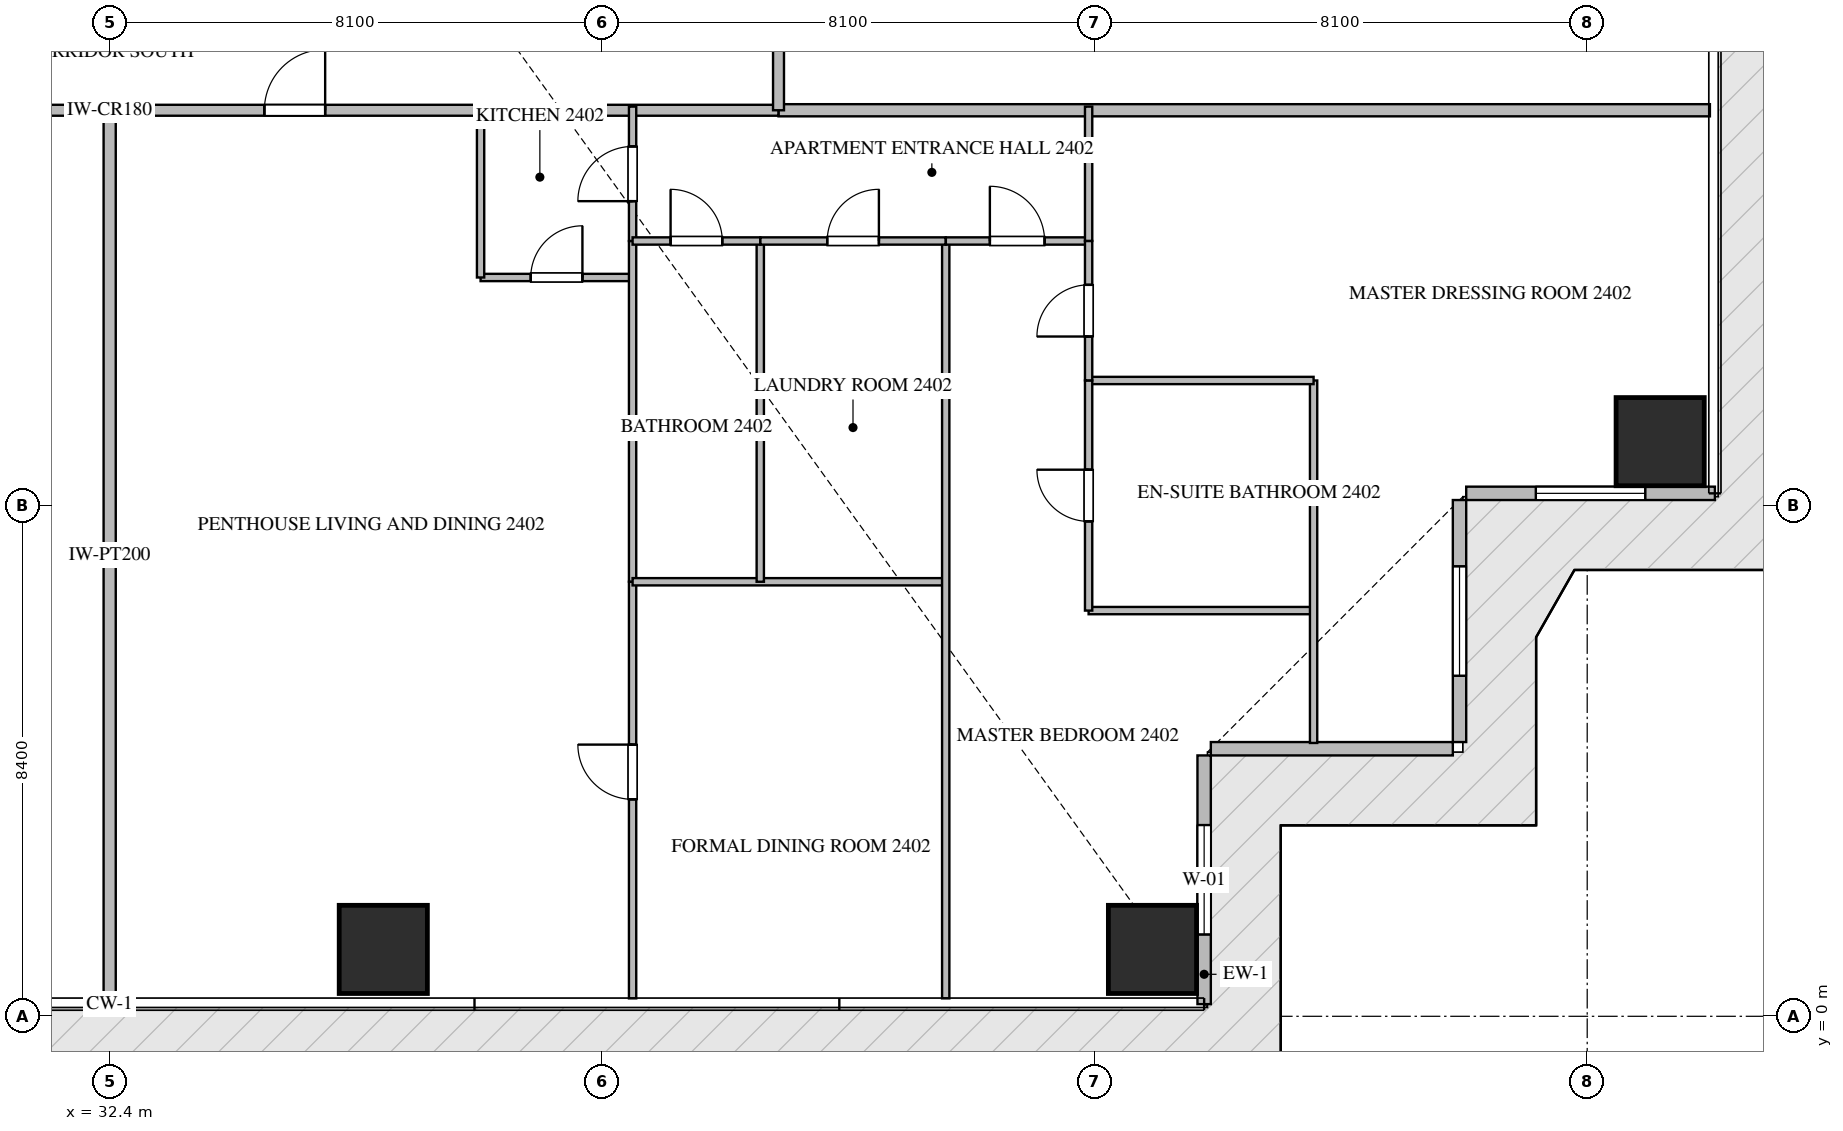
"""IFC4 building model, lengths in metres.
Left out: names, types, materials, properties, quantities, classifications, styles, units other than length and angle.
Written with IfcOpenShell. Run it as: python <this file> out.ifc"""

import sys

from ifc_helpers import new_model, si_unit, direction, frame, frame_2d, origin, origin_2d, place, context, subcontext, project, spatial, rectangle, extrude, source, transform, mapped, element, fill, save


model = new_model("IFC4")
c1 = context("Model", 3, precision=1e-05, world=origin(), true_north=direction((0.0, 1.0)))
c2 = subcontext(c1, "Body", "Model", "MODEL_VIEW")
j1 = project(units=[si_unit("LENGTHUNIT", "METRE"), si_unit("PLANEANGLEUNIT", "RADIAN")], contexts=[c1])
p1 = place(None, origin())
s1 = spatial("IfcSite", under=j1, at=p1, CompositionType="ELEMENT")
p2 = place(p1, origin())
s2 = spatial("IfcBuilding", under=s1, at=p2, CompositionType="ELEMENT")
p3 = place(p2, frame((0.0, 0.0, 97.95)))
s3 = spatial("IfcBuildingStorey", under=s2, at=p3, CompositionType="ELEMENT", Elevation=97.95)
m1 = source(origin(), c2, "Body", "SweptSolid", [
    extrude(rectangle(XDim=1.45, YDim=1.45, at=origin_2d()), origin(), (0.0, 0.0, 1.0), 3.75),
])
for number, where, z_axis, x_axis in (
    (1, (36.9, 1.1, -0.26), (0.0, 0.0, 1.0), (1.0, 0.0, 0.0)),
    (2, (49.55, 1.1, -0.26), (0.0, 0.0, 1.0), (1.0, 0.0, 0.0)),
    (3, (57.9, 9.45, -0.26), (0.0, 0.0, 1.0), (1.0, 0.0, 0.0)),
):
    element("IfcColumn", number, at=place(p3, frame(where, z_axis=z_axis, x_axis=x_axis)), inside=s3, PredefinedType="COLUMN", context=c2, shape_type="MappedRepresentation", body=[
        mapped(m1, transform((0.0, 0.0, 0.0), scale=1.0)),
    ])
p4 = place(p3, frame((50.4, 0.2, 0.0), z_axis=(0.0, 0.0, 1.0), x_axis=(0.0, 1.0, 0.0)))
e4 = element("IfcWall", 4, at=p4, inside=s3, PredefinedType="ELEMENTEDWALL", context=c2, shape_type="SweptSolid", body=[
    extrude(rectangle(XDim=4.09, YDim=0.22, at=frame_2d((2.045, 0.0))), origin(), (0.0, 0.0, 1.0), 3.475),
])
p5 = place(p4, frame((1.145, 0.0, 0.65)))
e5 = element("IfcOpeningElement", 5, at=p5, cuts=e4, PredefinedType="OPENING", context=c2, shape_type="SweptSolid", body=[
    extrude(rectangle(XDim=1.8, YDim=2.1, at=frame_2d((0.9, 1.05))), frame((0.0, 0.12, 0.0), z_axis=(0.0, -1.0, 0.0), x_axis=(1.0, 0.0, 0.0)), (0.0, 0.0, 1.0), 0.24),
])
p6 = place(p3, frame((50.51, 4.4, 0.0), z_axis=(0.0, 0.0, 1.0), x_axis=(1.0, 0.0, 0.0)))
e6 = element("IfcWall", 6, at=p6, inside=s3, PredefinedType="ELEMENTEDWALL", context=c2, shape_type="SweptSolid", body=[
    extrude(rectangle(XDim=3.98, YDim=0.22, at=frame_2d((1.99, 0.0))), origin(), (0.0, 0.0, 1.0), 3.475),
])
p7 = place(p3, frame((54.6, 4.51, 0.0), z_axis=(0.0, 0.0, 1.0), x_axis=(0.0, 1.0, 0.0)))
e7 = element("IfcWall", 7, at=p7, inside=s3, PredefinedType="ELEMENTEDWALL", context=c2, shape_type="SweptSolid", body=[
    extrude(rectangle(XDim=3.98, YDim=0.22, at=frame_2d((1.99, 0.0))), origin(), (0.0, 0.0, 1.0), 3.475),
])
p8 = place(p7, frame((1.09, 0.0, 0.65)))
e8 = element("IfcOpeningElement", 8, at=p8, cuts=e7, PredefinedType="OPENING", context=c2, shape_type="SweptSolid", body=[
    extrude(rectangle(XDim=1.8, YDim=2.1, at=frame_2d((0.9, 1.05))), frame((0.0, 0.12, 0.0), z_axis=(0.0, -1.0, 0.0), x_axis=(1.0, 0.0, 0.0)), (0.0, 0.0, 1.0), 0.24),
])
p9 = place(p3, frame((54.71, 8.6, 0.0), z_axis=(0.0, 0.0, 1.0), x_axis=(1.0, 0.0, 0.0)))
e9 = element("IfcWall", 9, at=p9, inside=s3, PredefinedType="ELEMENTEDWALL", context=c2, shape_type="SweptSolid", body=[
    extrude(rectangle(XDim=4.09, YDim=0.22, at=frame_2d((2.045, 0.0))), origin(), (0.0, 0.0, 1.0), 3.475),
])
p10 = place(p9, frame((1.145, 0.0, 0.65)))
e10 = element("IfcOpeningElement", 10, at=p10, cuts=e9, PredefinedType="OPENING", context=c2, shape_type="SweptSolid", body=[
    extrude(rectangle(XDim=1.8, YDim=2.1, at=frame_2d((0.9, 1.05))), frame((0.0, 0.12, 0.0), z_axis=(0.0, -1.0, 0.0), x_axis=(1.0, 0.0, 0.0)), (0.0, 0.0, 1.0), 0.24),
])
p11 = place(p3, frame((32.4, 0.282, 0.0), z_axis=(0.0, 0.0, 1.0), x_axis=(0.0, 1.0, 0.0)))
e11 = element("IfcWall", 11, at=p11, inside=s3, PredefinedType="PARTITIONING", context=c2, shape_type="SweptSolid", body=[
    extrude(rectangle(XDim=14.618, YDim=0.2, at=frame_2d((7.309, 0.0))), origin(), (0.0, 0.0, 1.0), 3.49),
])
p12 = place(p3, frame((43.4, 14.9, 0.0), z_axis=(0.0, 0.0, 1.0), x_axis=(1.0, 0.0, 0.0)))
e12 = element("IfcWall", 12, at=p12, inside=s3, PredefinedType="PARTITIONING", context=c2, shape_type="SweptSolid", body=[
    extrude(rectangle(XDim=15.318, YDim=0.2, at=frame_2d((7.659, 0.0))), origin(), (0.0, 0.0, 1.0), 3.49),
])
p13 = place(p3, frame((21.402, 14.9, 0.0), z_axis=(0.0, 0.0, 1.0), x_axis=(1.0, 0.0, 0.0)))
e13 = element("IfcWall", 13, at=p13, inside=s3, PredefinedType="PARTITIONING", context=c2, shape_type="SweptSolid", body=[
    extrude(rectangle(XDim=21.996, YDim=0.18, at=frame_2d((10.998, 0.0))), origin(), (0.0, 0.0, 1.0), 3.49),
])
p14 = place(p13, frame((7.454, 0.0, 0.0)))
e14 = element("IfcOpeningElement", 14, at=p14, cuts=e13, PredefinedType="OPENING", context=c2, shape_type="SweptSolid", body=[
    extrude(rectangle(XDim=1.0, YDim=2.15, at=frame_2d((0.5, 1.075))), frame((0.0, 0.1, 0.0), z_axis=(0.0, -1.0, 0.0), x_axis=(1.0, 0.0, 0.0)), (0.0, 0.0, 1.0), 0.2),
])
p15 = place(p13, frame((13.542, 0.0, 0.0)))
e15 = element("IfcOpeningElement", 15, at=p15, cuts=e13, PredefinedType="OPENING", context=c2, shape_type="SweptSolid", body=[
    extrude(rectangle(XDim=1.0, YDim=2.15, at=frame_2d((0.5, 1.075))), frame((0.0, 0.1, 0.0), z_axis=(0.0, -1.0, 0.0), x_axis=(1.0, 0.0, 0.0)), (0.0, 0.0, 1.0), 0.2),
])
p16 = place(p3, frame((43.4, 14.9, 0.0), z_axis=(0.0, 0.0, 1.0), x_axis=(0.0, 1.0, 0.0)))
e16 = element("IfcWall", 16, at=p16, inside=s3, PredefinedType="PARTITIONING", context=c2, shape_type="SweptSolid", body=[
    extrude(rectangle(XDim=20.6, YDim=0.18, at=frame_2d((10.3, 0.0))), origin(), (0.0, 0.0, 1.0), 3.49),
])
p17 = place(p16, frame((1.96, 0.0, 0.0)))
e17 = element("IfcOpeningElement", 17, at=p17, cuts=e16, PredefinedType="OPENING", context=c2, shape_type="SweptSolid", body=[
    extrude(rectangle(XDim=1.0, YDim=2.15, at=frame_2d((0.5, 1.075))), frame((0.0, 0.1, 0.0), z_axis=(0.0, -1.0, 0.0), x_axis=(1.0, 0.0, 0.0)), (0.0, 0.0, 1.0), 0.2),
])
p18 = place(p3, frame((38.5, 12.15, 0.0), z_axis=(0.0, 0.0, 1.0), x_axis=(1.0, 0.0, 0.0)))
e18 = element("IfcWall", 18, at=p18, inside=s3, PredefinedType="PARTITIONING", context=c2, shape_type="SweptSolid", body=[
    extrude(rectangle(XDim=2.5, YDim=0.12, at=frame_2d((1.25, 0.0))), origin(), (0.0, 0.0, 1.0), 3.49),
])
p19 = place(p18, frame((0.825, 0.0, 0.0)))
e19 = element("IfcOpeningElement", 19, at=p19, cuts=e18, PredefinedType="OPENING", context=c2, shape_type="SweptSolid", body=[
    extrude(rectangle(XDim=0.85, YDim=2.1, at=frame_2d((0.425, 1.05))), frame((0.0, 0.07, 0.0), z_axis=(0.0, -1.0, 0.0), x_axis=(1.0, 0.0, 0.0)), (0.0, 0.0, 1.0), 0.14),
])
p20 = place(p3, frame((38.5, 12.15, 0.0), z_axis=(0.0, 0.0, 1.0), x_axis=(0.0, 1.0, 0.0)))
e20 = element("IfcWall", 20, at=p20, inside=s3, PredefinedType="PARTITIONING", context=c2, shape_type="SweptSolid", body=[
    extrude(rectangle(XDim=2.81, YDim=0.12, at=frame_2d((1.405, 0.0))), origin(), (0.0, 0.0, 1.0), 3.49),
])
p21 = place(p3, frame((41.0, 12.75, 0.0), z_axis=(0.0, 0.0, 1.0), x_axis=(0.0, 1.0, 0.0)))
e21 = element("IfcWall", 21, at=p21, inside=s3, PredefinedType="PARTITIONING", context=c2, shape_type="SweptSolid", body=[
    extrude(rectangle(XDim=2.21, YDim=0.12, at=frame_2d((1.105, 0.0))), origin(), (0.0, 0.0, 1.0), 3.49),
])
p22 = place(p21, frame((0.655, 0.0, 0.0)))
e22 = element("IfcOpeningElement", 22, at=p22, cuts=e21, PredefinedType="OPENING", context=c2, shape_type="SweptSolid", body=[
    extrude(rectangle(XDim=0.9, YDim=2.1, at=frame_2d((0.45, 1.05))), frame((0.0, 0.07, 0.0), z_axis=(0.0, -1.0, 0.0), x_axis=(1.0, 0.0, 0.0)), (0.0, 0.0, 1.0), 0.14),
])
p23 = place(p3, frame((41.0, 0.295, 0.0), z_axis=(0.0, 0.0, 1.0), x_axis=(0.0, 1.0, 0.0)))
e23 = element("IfcWall", 23, at=p23, inside=s3, PredefinedType="PARTITIONING", context=c2, shape_type="SweptSolid", body=[
    extrude(rectangle(XDim=6.851, YDim=0.12, at=frame_2d((3.426, 0.0))), origin(), (0.0, 0.0, 1.0), 3.49),
])
p24 = place(p23, frame((3.273, 0.0, 0.0)))
e24 = element("IfcOpeningElement", 24, at=p24, cuts=e23, PredefinedType="OPENING", context=c2, shape_type="SweptSolid", body=[
    extrude(rectangle(XDim=0.9, YDim=2.1, at=frame_2d((0.45, 1.05))), frame((0.0, 0.07, 0.0), z_axis=(0.0, -1.0, 0.0), x_axis=(1.0, 0.0, 0.0)), (0.0, 0.0, 1.0), 0.14),
])
p25 = place(p3, frame((41.0, 7.148, 0.0), z_axis=(0.0, 0.0, 1.0), x_axis=(0.0, 1.0, 0.0)))
e25 = element("IfcWall", 25, at=p25, inside=s3, PredefinedType="PARTITIONING", context=c2, shape_type="SweptSolid", body=[
    extrude(rectangle(XDim=5.6, YDim=0.12, at=frame_2d((2.8, 0.0))), origin(), (0.0, 0.0, 1.0), 3.49),
])
p26 = place(p3, frame((41.0, 7.146, 0.0), z_axis=(0.0, 0.0, 1.0), x_axis=(1.0, 0.0, 0.0)))
e26 = element("IfcWall", 26, at=p26, inside=s3, PredefinedType="PARTITIONING", context=c2, shape_type="SweptSolid", body=[
    extrude(rectangle(XDim=5.15, YDim=0.12, at=frame_2d((2.575, 0.0))), origin(), (0.0, 0.0, 1.0), 3.49),
])
p27 = place(p3, frame((46.15, 0.295, 0.0), z_axis=(0.0, 0.0, 1.0), x_axis=(0.0, 1.0, 0.0)))
e27 = element("IfcWall", 27, at=p27, inside=s3, PredefinedType="PARTITIONING", context=c2, shape_type="SweptSolid", body=[
    extrude(rectangle(XDim=12.455, YDim=0.12, at=frame_2d((6.228, 0.0))), origin(), (0.0, 0.0, 1.0), 3.49),
])
p28 = place(p3, frame((43.1, 7.146, 0.0), z_axis=(0.0, 0.0, 1.0), x_axis=(0.0, 1.0, 0.0)))
e28 = element("IfcWall", 28, at=p28, inside=s3, PredefinedType="PARTITIONING", context=c2, shape_type="SweptSolid", body=[
    extrude(rectangle(XDim=5.604, YDim=0.12, at=frame_2d((2.802, 0.0))), origin(), (0.0, 0.0, 1.0), 3.49),
])
p29 = place(p3, frame((41.0, 12.75, 0.0), z_axis=(0.0, 0.0, 1.0), x_axis=(1.0, 0.0, 0.0)))
e29 = element("IfcWall", 29, at=p29, inside=s3, PredefinedType="PARTITIONING", context=c2, shape_type="SweptSolid", body=[
    extrude(rectangle(XDim=2.1, YDim=0.12, at=frame_2d((1.05, 0.0))), origin(), (0.0, 0.0, 1.0), 3.49),
])
p30 = place(p29, frame((0.625, 0.0, 0.0)))
e30 = element("IfcOpeningElement", 30, at=p30, cuts=e29, PredefinedType="OPENING", context=c2, shape_type="SweptSolid", body=[
    extrude(rectangle(XDim=0.85, YDim=2.1, at=frame_2d((0.425, 1.05))), frame((0.0, 0.07, 0.0), z_axis=(0.0, -1.0, 0.0), x_axis=(1.0, 0.0, 0.0)), (0.0, 0.0, 1.0), 0.14),
])
p31 = place(p3, frame((43.102, 12.75, 0.0), z_axis=(0.0, 0.0, 1.0), x_axis=(1.0, 0.0, 0.0)))
e31 = element("IfcWall", 31, at=p31, inside=s3, PredefinedType="PARTITIONING", context=c2, shape_type="SweptSolid", body=[
    extrude(rectangle(XDim=3.048, YDim=0.12, at=frame_2d((1.524, 0.0))), origin(), (0.0, 0.0, 1.0), 3.49),
])
p32 = place(p31, frame((1.099, 0.0, 0.0)))
e32 = element("IfcOpeningElement", 32, at=p32, cuts=e31, PredefinedType="OPENING", context=c2, shape_type="SweptSolid", body=[
    extrude(rectangle(XDim=0.85, YDim=2.1, at=frame_2d((0.425, 1.05))), frame((0.0, 0.07, 0.0), z_axis=(0.0, -1.0, 0.0), x_axis=(1.0, 0.0, 0.0)), (0.0, 0.0, 1.0), 0.14),
])
p33 = place(p3, frame((46.152, 12.75, 0.0), z_axis=(0.0, 0.0, 1.0), x_axis=(1.0, 0.0, 0.0)))
e33 = element("IfcWall", 33, at=p33, inside=s3, PredefinedType="PARTITIONING", context=c2, shape_type="SweptSolid", body=[
    extrude(rectangle(XDim=2.348, YDim=0.12, at=frame_2d((1.174, 0.0))), origin(), (0.0, 0.0, 1.0), 3.49),
])
p34 = place(p33, frame((0.724, 0.0, 0.0)))
e34 = element("IfcOpeningElement", 34, at=p34, cuts=e33, PredefinedType="OPENING", context=c2, shape_type="SweptSolid", body=[
    extrude(rectangle(XDim=0.9, YDim=2.1, at=frame_2d((0.45, 1.05))), frame((0.0, 0.07, 0.0), z_axis=(0.0, -1.0, 0.0), x_axis=(1.0, 0.0, 0.0)), (0.0, 0.0, 1.0), 0.14),
])
p35 = place(p3, frame((48.5, 6.672, 0.0), z_axis=(0.0, 0.0, 1.0), x_axis=(1.0, 0.0, 0.0)))
e35 = element("IfcWall", 35, at=p35, inside=s3, PredefinedType="PARTITIONING", context=c2, shape_type="SweptSolid", body=[
    extrude(rectangle(XDim=3.7, YDim=0.12, at=frame_2d((1.85, 0.0))), origin(), (0.0, 0.0, 1.0), 3.49),
])
p36 = place(p3, frame((52.2, 4.495, 0.0), z_axis=(0.0, 0.0, 1.0), x_axis=(0.0, 1.0, 0.0)))
e36 = element("IfcWall", 36, at=p36, inside=s3, PredefinedType="PARTITIONING", context=c2, shape_type="SweptSolid", body=[
    extrude(rectangle(XDim=5.961, YDim=0.12, at=frame_2d((2.98, 0.0))), origin(), (0.0, 0.0, 1.0), 3.49),
])
p37 = place(p3, frame((48.5, 10.456, 0.0), z_axis=(0.0, 0.0, 1.0), x_axis=(1.0, 0.0, 0.0)))
e37 = element("IfcWall", 37, at=p37, inside=s3, PredefinedType="PARTITIONING", context=c2, shape_type="SweptSolid", body=[
    extrude(rectangle(XDim=3.7, YDim=0.12, at=frame_2d((1.85, 0.0))), origin(), (0.0, 0.0, 1.0), 3.49),
])
p38 = place(p3, frame((48.5, 6.672, 0.0), z_axis=(0.0, 0.0, 1.0), x_axis=(0.0, 1.0, 0.0)))
e38 = element("IfcWall", 38, at=p38, inside=s3, PredefinedType="PARTITIONING", context=c2, shape_type="SweptSolid", body=[
    extrude(rectangle(XDim=3.784, YDim=0.12, at=frame_2d((1.892, 0.0))), origin(), (0.0, 0.0, 1.0), 3.49),
])
p39 = place(p38, frame((1.467, 0.0, 0.0)))
e39 = element("IfcOpeningElement", 39, at=p39, cuts=e38, PredefinedType="OPENING", context=c2, shape_type="SweptSolid", body=[
    extrude(rectangle(XDim=0.85, YDim=2.1, at=frame_2d((0.425, 1.05))), frame((0.0, 0.07, 0.0), z_axis=(0.0, -1.0, 0.0), x_axis=(1.0, 0.0, 0.0)), (0.0, 0.0, 1.0), 0.14),
])
p40 = place(p3, frame((48.5, 10.458, 0.0), z_axis=(0.0, 0.0, 1.0), x_axis=(0.0, 1.0, 0.0)))
e40 = element("IfcWall", 40, at=p40, inside=s3, PredefinedType="PARTITIONING", context=c2, shape_type="SweptSolid", body=[
    extrude(rectangle(XDim=2.292, YDim=0.12, at=frame_2d((1.146, 0.0))), origin(), (0.0, 0.0, 1.0), 3.49),
])
p41 = place(p40, frame((0.721, 0.0, 0.0)))
e41 = element("IfcOpeningElement", 41, at=p41, cuts=e40, PredefinedType="OPENING", context=c2, shape_type="SweptSolid", body=[
    extrude(rectangle(XDim=0.85, YDim=2.1, at=frame_2d((0.425, 1.05))), frame((0.0, 0.07, 0.0), z_axis=(0.0, -1.0, 0.0), x_axis=(1.0, 0.0, 0.0)), (0.0, 0.0, 1.0), 0.14),
])
p42 = place(p3, frame((48.5, 12.752, 0.0), z_axis=(0.0, 0.0, 1.0), x_axis=(0.0, 1.0, 0.0)))
e42 = element("IfcWall", 42, at=p42, inside=s3, PredefinedType="PARTITIONING", context=c2, shape_type="SweptSolid", body=[
    extrude(rectangle(XDim=2.208, YDim=0.12, at=frame_2d((1.104, 0.0))), origin(), (0.0, 0.0, 1.0), 3.49),
])
m2 = source(origin(), c2, "Body", "SweptSolid", [
    extrude(rectangle(XDim=1.8, YDim=2.1, at=frame_2d((0.9, 1.05))), frame((0.0, 0.03, 0.0), z_axis=(0.0, -1.0, 0.0), x_axis=(1.0, 0.0, 0.0)), (0.0, 0.0, 1.0), 0.06),
])
p43 = place(p5, origin())
e43 = element("IfcWindow", 43, at=p43, inside=s3, PartitioningType="SINGLE_PANEL", PredefinedType="WINDOW", context=c2, shape_type="MappedRepresentation", body=[
    mapped(m2, transform((0.0, 0.0, 0.0), scale=1.0)),
])
fill(e5, e43)
p44 = place(p8, origin())
e44 = element("IfcWindow", 44, at=p44, inside=s3, PartitioningType="SINGLE_PANEL", PredefinedType="WINDOW", context=c2, shape_type="MappedRepresentation", body=[
    mapped(m2, transform((0.0, 0.0, 0.0), scale=1.0)),
])
fill(e8, e44)
p45 = place(p10, origin())
e45 = element("IfcWindow", 45, at=p45, inside=s3, PartitioningType="SINGLE_PANEL", PredefinedType="WINDOW", context=c2, shape_type="MappedRepresentation", body=[
    mapped(m2, transform((0.0, 0.0, 0.0), scale=1.0)),
])
fill(e10, e45)
m3 = source(origin(), c2, "Body", "SweptSolid", [
    extrude(rectangle(XDim=1.0, YDim=2.15, at=frame_2d((0.5, 1.075))), frame((0.0, 0.025, 0.0), z_axis=(0.0, -1.0, 0.0), x_axis=(1.0, 0.0, 0.0)), (0.0, 0.0, 1.0), 0.05),
])
p46 = place(p15, origin())
e46 = element("IfcDoor", 46, at=p46, inside=s3, OperationType="SINGLE_SWING_RIGHT", PredefinedType="DOOR", context=c2, shape_type="MappedRepresentation", body=[
    mapped(m3, transform((0.0, 0.0, 0.0), scale=1.0)),
])
fill(e15, e46)
m4 = source(origin(), c2, "Body", "SweptSolid", [
    extrude(rectangle(XDim=0.85, YDim=2.1, at=frame_2d((0.425, 1.05))), frame((0.0, 0.025, 0.0), z_axis=(0.0, -1.0, 0.0), x_axis=(1.0, 0.0, 0.0)), (0.0, 0.0, 1.0), 0.05),
])
p47 = place(p19, origin())
e47 = element("IfcDoor", 47, at=p47, inside=s3, OperationType="SINGLE_SWING_RIGHT", PredefinedType="DOOR", context=c2, shape_type="MappedRepresentation", body=[
    mapped(m4, transform((0.0, 0.0, 0.0), scale=1.0)),
])
fill(e19, e47)
m5 = source(origin(), c2, "Body", "SweptSolid", [
    extrude(rectangle(XDim=0.9, YDim=2.1, at=frame_2d((0.45, 1.05))), frame((0.0, 0.025, 0.0), z_axis=(0.0, -1.0, 0.0), x_axis=(1.0, 0.0, 0.0)), (0.0, 0.0, 1.0), 0.05),
])
p48 = place(p22, origin())
e48 = element("IfcDoor", 48, at=p48, inside=s3, OperationType="SINGLE_SWING_LEFT", PredefinedType="DOOR", context=c2, shape_type="MappedRepresentation", body=[
    mapped(m5, transform((0.0, 0.0, 0.0), scale=1.0)),
])
fill(e22, e48)
p49 = place(p24, origin())
e49 = element("IfcDoor", 49, at=p49, inside=s3, OperationType="SINGLE_SWING_RIGHT", PredefinedType="DOOR", context=c2, shape_type="MappedRepresentation", body=[
    mapped(m5, transform((0.0, 0.0, 0.0), scale=1.0)),
])
fill(e24, e49)
p50 = place(p30, origin())
e50 = element("IfcDoor", 50, at=p50, inside=s3, OperationType="SINGLE_SWING_LEFT", PredefinedType="DOOR", context=c2, shape_type="MappedRepresentation", body=[
    mapped(m4, transform((0.0, 0.0, 0.0), scale=1.0)),
])
fill(e30, e50)
p51 = place(p32, origin())
e51 = element("IfcDoor", 51, at=p51, inside=s3, OperationType="SINGLE_SWING_RIGHT", PredefinedType="DOOR", context=c2, shape_type="MappedRepresentation", body=[
    mapped(m4, transform((0.0, 0.0, 0.0), scale=1.0)),
])
fill(e32, e51)
p52 = place(p34, origin())
e52 = element("IfcDoor", 52, at=p52, inside=s3, OperationType="SINGLE_SWING_LEFT", PredefinedType="DOOR", context=c2, shape_type="MappedRepresentation", body=[
    mapped(m5, transform((0.0, 0.0, 0.0), scale=1.0)),
])
fill(e34, e52)
p53 = place(p39, origin())
e53 = element("IfcDoor", 53, at=p53, inside=s3, OperationType="SINGLE_SWING_RIGHT", PredefinedType="DOOR", context=c2, shape_type="MappedRepresentation", body=[
    mapped(m4, transform((0.0, 0.0, 0.0), scale=1.0)),
])
fill(e39, e53)
p54 = place(p41, origin())
e54 = element("IfcDoor", 54, at=p54, inside=s3, OperationType="SINGLE_SWING_LEFT", PredefinedType="DOOR", context=c2, shape_type="MappedRepresentation", body=[
    mapped(m4, transform((0.0, 0.0, 0.0), scale=1.0)),
])
fill(e41, e54)
save(model, sys.argv[1])
